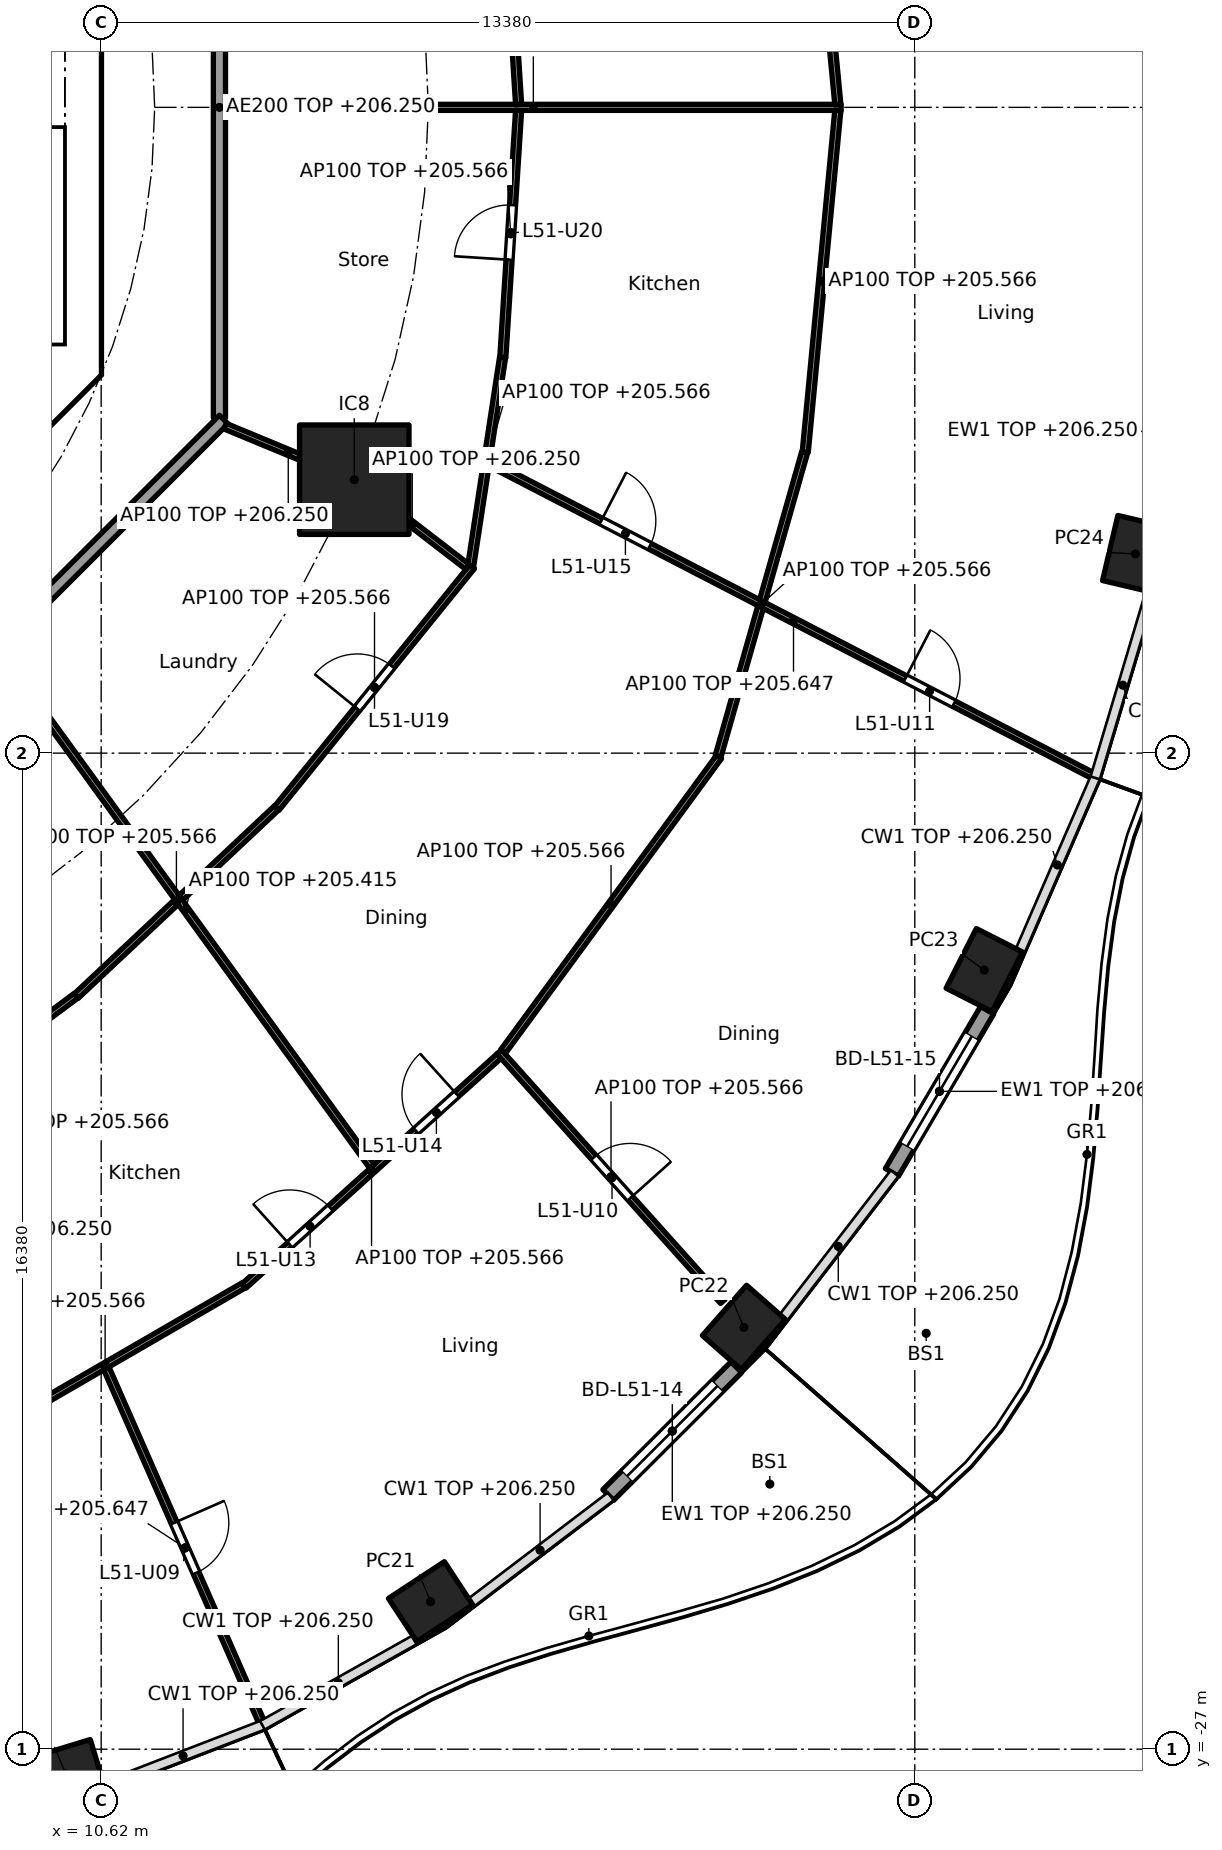
"""IFC4 building model, lengths in metres.
Left out: names, types, materials, properties, quantities, classifications, styles, units other than length and angle.
Written with IfcOpenShell. Run it as: python <this file> out.ifc"""

import sys

from ifc_helpers import new_model, si_unit, direction, frame, frame_2d, origin, origin_2d, place, context, subcontext, project, spatial, polyline, rectangle, hollow_rectangle, outline, extrude, element, fill, save


model = new_model("IFC4")
c1 = context("Model", 3, precision=1e-05, world=origin(), true_north=direction((0.0, 1.0)))
c2 = subcontext(c1, "Body", "Model", "MODEL_VIEW")
j1 = project(units=[si_unit("LENGTHUNIT", "METRE"), si_unit("PLANEANGLEUNIT", "RADIAN")], contexts=[c1])
p1 = place(None, origin())
s1 = spatial("IfcSite", under=j1, at=p1, CompositionType="ELEMENT")
p2 = place(p1, origin())
s2 = spatial("IfcBuilding", under=s1, at=p2, CompositionType="ELEMENT")
p3 = place(p2, frame((0.0, 0.0, 202.9)))
s3 = spatial("IfcBuildingStorey", under=s2, at=p3, CompositionType="ELEMENT", Elevation=202.9)
for number, where, z_axis, x_axis in (
    (1, (10.038, -27.408, 0.0), (0.0, 0.0, 1.0), (0.957, 0.292, 0.0)),
    (2, (16.038, -24.573, 0.0), (0.0, 0.0, 1.0), (0.836, 0.549, 0.0)),
    (3, (21.189, -20.064, 0.0), (0.0, 0.0, 1.0), (0.66, 0.751, 0.0)),
    (4, (25.142, -14.188, 0.0), (0.0, 0.0, 1.0), (0.452, 0.892, 0.0)),
    (5, (27.627, -7.344, 0.0), (0.0, 0.0, 1.0), (0.229, 0.973, 0.0)),
):
    element("IfcColumn", number, at=place(p3, frame(where, z_axis=z_axis, x_axis=x_axis)), inside=s3, PredefinedType="COLUMN", context=c2, shape_type="SweptSolid", body=[
        extrude(hollow_rectangle(XDim=1.1, YDim=0.85, WallThickness=0.036, at=origin_2d()), origin(), (0.0, 0.0, 1.0), 3.7),
    ])
p4 = place(p3, frame((14.782, -6.123, 0.0), z_axis=(0.0, 0.0, 1.0), x_axis=(1.0, 0.0, 0.0)))
e6 = element("IfcColumn", 6, at=p4, inside=s3, PredefinedType="COLUMN", context=c2, shape_type="SweptSolid", body=[
    extrude(rectangle(XDim=1.8, YDim=1.8, at=origin_2d()), origin(), (0.0, 0.0, 1.0), 3.7),
])
p5 = place(p3, frame((21.065, -20.718, 0.0), z_axis=(0.0, 0.0, 1.0), x_axis=(-0.707844845069, -0.706367946122, 0.0)))
e7 = element("IfcWall", 7, at=p5, inside=s3, PredefinedType="SOLIDWALL", context=c2, shape_type="SweptSolid", body=[
    extrude(rectangle(XDim=2.976, YDim=0.25, at=frame_2d((1.488, 0.0))), origin(), (0.0, 0.0, 1.0), 3.35),
])
p6 = place(p5, frame((0.438, 0.0, 0.0)))
e8 = element("IfcOpeningElement", 8, at=p6, cuts=e7, PredefinedType="OPENING", context=c2, shape_type="SweptSolid", body=[
    extrude(rectangle(XDim=2.1, YDim=2.4, at=frame_2d((1.05, 1.2))), frame((0.0, 0.135, 0.0), z_axis=(0.0, -1.0, 0.0), x_axis=(1.0, 0.0, 0.0)), (0.0, 0.0, 1.0), 0.27),
])
p7 = place(p3, frame((25.189, -14.848, 0.0), z_axis=(0.0, 0.0, 1.0), x_axis=(-0.506367803691, -0.862317602386, 0.0)))
e9 = element("IfcWall", 9, at=p7, inside=s3, PredefinedType="SOLIDWALL", context=c2, shape_type="SweptSolid", body=[
    extrude(rectangle(XDim=3.092, YDim=0.25, at=frame_2d((1.546, 0.0))), origin(), (0.0, 0.0, 1.0), 3.35),
])
p8 = place(p7, frame((0.496, 0.0, 0.0)))
e10 = element("IfcOpeningElement", 10, at=p8, cuts=e9, PredefinedType="OPENING", context=c2, shape_type="SweptSolid", body=[
    extrude(rectangle(XDim=2.1, YDim=2.4, at=frame_2d((1.05, 1.2))), frame((0.0, 0.135, 0.0), z_axis=(0.0, -1.0, 0.0), x_axis=(1.0, 0.0, 0.0)), (0.0, 0.0, 1.0), 0.27),
])
p9 = place(p3, frame((4.613, -9.988, 0.0), z_axis=(0.0, 0.0, 1.0), x_axis=(0.707106781187, 0.707106781187, 0.0)))
e11 = element("IfcWall", 11, at=p9, inside=s3, PredefinedType="SHEAR", context=c2, shape_type="SweptSolid", body=[
    extrude(rectangle(XDim=7.602, YDim=0.6, at=frame_2d((3.801, 0.0))), origin(), (0.0, 0.0, 1.0), 3.35),
])
p10 = place(p9, frame((3.201, 0.0, 0.0)))
e12 = element("IfcOpeningElement", 12, at=p10, cuts=e11, PredefinedType="OPENING", context=c2, shape_type="SweptSolid", body=[
    extrude(rectangle(XDim=1.2, YDim=2.1, at=frame_2d((0.6, 1.05))), frame((0.0, 0.31, 0.0), z_axis=(0.0, -1.0, 0.0), x_axis=(1.0, 0.0, 0.0)), (0.0, 0.0, 1.0), 0.62),
])
p11 = place(p3, origin())
e13 = element("IfcWall", 13, at=p11, inside=s3, PredefinedType="SHEAR", context=c2, shape_type="SweptSolid", body=[
    extrude(outline(polyline([(9.776, -4.401), (10.025, -4.152), (10.025, -3.801), (10.025, 4.152), (9.776, 4.401), (10.2, 4.825), (10.625, 4.401), (10.625, -4.401), (10.2, -4.825), (9.776, -4.401)])), origin(), (0.0, 0.0, 1.0), 3.35),
])
p12 = place(p3, origin())
e14 = element("IfcWall", 14, at=p12, inside=s3, PredefinedType="SOLIDWALL", context=c2, shape_type="SweptSolid", body=[
    extrude(outline(polyline([(10.025, -4.1), (6.7, -4.1), (6.7, -3.9), (10.025, -3.9), (10.025, -4.1)])), origin(), (0.0, 0.0, 1.0), 3.35),
])
p13 = place(p3, frame((12.565, -5.104, 0.0), z_axis=(0.0, 0.0, 1.0), x_axis=(0.0, 1.0, 0.0)))
e15 = element("IfcWall", 15, at=p13, inside=s3, PredefinedType="PARTITIONING", context=c2, shape_type="SweptSolid", body=[
    extrude(rectangle(XDim=10.209, YDim=0.2, at=frame_2d((5.104, 0.0))), origin(), (0.0, 0.0, 1.0), 3.35),
])
p14 = place(p3, frame((5.275, -12.494, 0.0), z_axis=(0.0, 0.0, 1.0), x_axis=(0.707106781187, 0.707106781187, 0.0)))
e16 = element("IfcWall", 16, at=p14, inside=s3, PredefinedType="PARTITIONING", context=c2, shape_type="SweptSolid", body=[
    extrude(rectangle(XDim=10.409, YDim=0.2, at=frame_2d((5.205, 0.0))), origin(), (0.0, 0.0, 1.0), 3.35),
])
p15 = place(p3, frame((12.665, 0.0, 0.0), z_axis=(0.0, 0.0, 1.0), x_axis=(1.0, 0.0, 0.0)))
e17 = element("IfcWall", 17, at=p15, inside=s3, PredefinedType="PARTITIONING", context=c2, shape_type="SweptSolid", body=[
    extrude(rectangle(XDim=10.124, YDim=0.1, at=frame_2d((5.062, 0.0))), origin(), (0.0, 0.0, 1.0), 2.515),
])
p16 = place(p3, frame((17.485, 0.05, 0.0), z_axis=(0.0, 0.0, 1.0), x_axis=(-0.063673473968, 0.997970785501, 0.0)))
e18 = element("IfcWall", 18, at=p16, inside=s3, PredefinedType="PARTITIONING", context=c2, shape_type="SweptSolid", body=[
    extrude(rectangle(XDim=4.072, YDim=0.1, at=frame_2d((2.036, 0.0))), origin(), (0.0, 0.0, 1.0), 2.666),
])
p17 = place(p16, frame((1.561, 0.0, 0.0)))
e19 = element("IfcOpeningElement", 19, at=p17, cuts=e18, PredefinedType="OPENING", context=c2, shape_type="SweptSolid", body=[
    extrude(rectangle(XDim=0.9, YDim=2.1, at=frame_2d((0.45, 1.05))), frame((0.0, 0.06, 0.0), z_axis=(0.0, -1.0, 0.0), x_axis=(1.0, 0.0, 0.0)), (0.0, 0.0, 1.0), 0.12),
])
p18 = place(p3, frame((17.485, -0.05, 0.0), z_axis=(0.0, 0.0, 1.0), x_axis=(-0.063673473968, -0.997970785501, 0.0)))
e20 = element("IfcWall", 20, at=p18, inside=s3, PredefinedType="PARTITIONING", context=c2, shape_type="SweptSolid", body=[
    extrude(rectangle(XDim=4.072, YDim=0.1, at=frame_2d((2.036, 0.0))), origin(), (0.0, 0.0, 1.0), 2.666),
])
p19 = place(p18, frame((1.561, 0.0, 0.0)))
e21 = element("IfcOpeningElement", 21, at=p19, cuts=e20, PredefinedType="OPENING", context=c2, shape_type="SweptSolid", body=[
    extrude(rectangle(XDim=0.9, YDim=2.1, at=frame_2d((0.45, 1.05))), frame((0.0, 0.06, 0.0), z_axis=(0.0, -1.0, 0.0), x_axis=(1.0, 0.0, 0.0)), (0.0, 0.0, 1.0), 0.12),
])
p20 = place(p3, frame((22.734, 0.05, 0.0), z_axis=(0.0, 0.0, 1.0), x_axis=(-0.0949274088, 0.995484197292, 0.0)))
e22 = element("IfcWall", 22, at=p20, inside=s3, PredefinedType="PARTITIONING", context=c2, shape_type="SweptSolid", body=[
    extrude(rectangle(XDim=5.648, YDim=0.1, at=frame_2d((2.824, 0.0))), origin(), (0.0, 0.0, 1.0), 2.666),
])
p21 = place(p20, frame((0.937, 0.0, 0.0)))
e23 = element("IfcOpeningElement", 23, at=p21, cuts=e22, PredefinedType="OPENING", context=c2, shape_type="SweptSolid", body=[
    extrude(rectangle(XDim=0.9, YDim=2.1, at=frame_2d((0.45, 1.05))), frame((0.0, 0.06, 0.0), z_axis=(0.0, -1.0, 0.0), x_axis=(1.0, 0.0, 0.0)), (0.0, 0.0, 1.0), 0.12),
])
p22 = place(p3, frame((22.734, -0.05, 0.0), z_axis=(0.0, 0.0, 1.0), x_axis=(-0.0949274088, -0.995484197292, 0.0)))
e24 = element("IfcWall", 24, at=p22, inside=s3, PredefinedType="PARTITIONING", context=c2, shape_type="SweptSolid", body=[
    extrude(rectangle(XDim=5.648, YDim=0.1, at=frame_2d((2.824, 0.0))), origin(), (0.0, 0.0, 1.0), 2.666),
])
p23 = place(p3, frame((6.881, -17.08, 0.0), z_axis=(0.0, 0.0, 1.0), x_axis=(0.802784956441, 0.596268659005, 0.0)))
e25 = element("IfcWall", 25, at=p23, inside=s3, PredefinedType="PARTITIONING", context=c2, shape_type="SweptSolid", body=[
    extrude(rectangle(XDim=4.142, YDim=0.1, at=frame_2d((2.071, 0.0))), origin(), (0.0, 0.0, 1.0), 2.666),
])
p24 = place(p23, frame((2.384, 0.0, 0.0)))
e26 = element("IfcOpeningElement", 26, at=p24, cuts=e25, PredefinedType="OPENING", context=c2, shape_type="SweptSolid", body=[
    extrude(rectangle(XDim=0.9, YDim=2.1, at=frame_2d((0.45, 1.05))), frame((0.0, 0.06, 0.0), z_axis=(0.0, -1.0, 0.0), x_axis=(1.0, 0.0, 0.0)), (0.0, 0.0, 1.0), 0.12),
])
p25 = place(p3, frame((8.405, -22.013, 0.0), z_axis=(0.0, 0.0, 1.0), x_axis=(0.865277177388, 0.501293732547, 0.0)))
e27 = element("IfcWall", 27, at=p25, inside=s3, PredefinedType="PARTITIONING", context=c2, shape_type="SweptSolid", body=[
    extrude(rectangle(XDim=5.27, YDim=0.1, at=frame_2d((2.635, 0.0))), origin(), (0.0, 0.0, 1.0), 2.666),
])
p26 = place(p3, frame((10.705, -20.738, 0.0), z_axis=(0.0, 0.0, 1.0), x_axis=(0.401740633891, -0.915753494714, 0.0)))
e28 = element("IfcWall", 28, at=p26, inside=s3, PredefinedType="PARTITIONING", context=c2, shape_type="SweptSolid", body=[
    extrude(rectangle(XDim=6.445, YDim=0.1, at=frame_2d((3.223, 0.0))), origin(), (0.0, 0.0, 1.0), 2.747),
])
p27 = place(p26, frame((2.773, 0.0, 0.0)))
e29 = element("IfcOpeningElement", 29, at=p27, cuts=e28, PredefinedType="OPENING", context=c2, shape_type="SweptSolid", body=[
    extrude(rectangle(XDim=0.9, YDim=2.1, at=frame_2d((0.45, 1.05))), frame((0.0, 0.06, 0.0), z_axis=(0.0, -1.0, 0.0), x_axis=(1.0, 0.0, 0.0)), (0.0, 0.0, 1.0), 0.12),
])
p28 = place(p3, frame((10.21, -14.614, 0.0), z_axis=(0.0, 0.0, 1.0), x_axis=(0.728883199496, 0.684638066055, 0.0)))
e30 = element("IfcWall", 30, at=p28, inside=s3, PredefinedType="PARTITIONING", context=c2, shape_type="SweptSolid", body=[
    extrude(rectangle(XDim=4.519, YDim=0.1, at=frame_2d((2.26, 0.0))), origin(), (0.0, 0.0, 1.0), 2.666),
])
p29 = place(p3, frame((12.971, -19.38, 0.0), z_axis=(0.0, 0.0, 1.0), x_axis=(0.742768881471, 0.669547898748, 0.0)))
e31 = element("IfcWall", 31, at=p29, inside=s3, PredefinedType="PARTITIONING", context=c2, shape_type="SweptSolid", body=[
    extrude(rectangle(XDim=5.642, YDim=0.1, at=frame_2d((2.821, 0.0))), origin(), (0.0, 0.0, 1.0), 2.666),
])
p30 = place(p29, frame((1.01, 0.0, 0.0)))
e32 = element("IfcOpeningElement", 32, at=p30, cuts=e31, PredefinedType="OPENING", context=c2, shape_type="SweptSolid", body=[
    extrude(rectangle(XDim=0.9, YDim=2.1, at=frame_2d((0.45, 1.05))), frame((0.0, 0.06, 0.0), z_axis=(0.0, -1.0, 0.0), x_axis=(1.0, 0.0, 0.0)), (0.0, 0.0, 1.0), 0.12),
])
p31 = place(p29, frame((3.806, 0.0, 0.0)))
e33 = element("IfcOpeningElement", 33, at=p31, cuts=e31, PredefinedType="OPENING", context=c2, shape_type="SweptSolid", body=[
    extrude(rectangle(XDim=0.9, YDim=2.1, at=frame_2d((0.45, 1.05))), frame((0.0, 0.06, 0.0), z_axis=(0.0, -1.0, 0.0), x_axis=(1.0, 0.0, 0.0)), (0.0, 0.0, 1.0), 0.12),
])
p32 = place(p3, frame((8.943, -8.966, 0.0), z_axis=(0.0, 0.0, 1.0), x_axis=(0.587181355751, -0.809455406714, 0.0)))
e34 = element("IfcWall", 34, at=p32, inside=s3, PredefinedType="PARTITIONING", context=c2, shape_type="SweptSolid", body=[
    extrude(rectangle(XDim=10.441, YDim=0.1, at=frame_2d((5.221, 0.0))), origin(), (0.0, 0.0, 1.0), 2.515),
])
p33 = place(p3, frame((13.509, -11.525, 0.0), z_axis=(0.0, 0.0, 1.0), x_axis=(0.628778729481, 0.777584277974, 0.0)))
e35 = element("IfcWall", 35, at=p33, inside=s3, PredefinedType="PARTITIONING", context=c2, shape_type="SweptSolid", body=[
    extrude(rectangle(XDim=5.107, YDim=0.1, at=frame_2d((2.554, 0.0))), origin(), (0.0, 0.0, 1.0), 2.666),
])
p34 = place(p33, frame((2.104, 0.0, 0.0)))
e36 = element("IfcOpeningElement", 36, at=p34, cuts=e35, PredefinedType="OPENING", context=c2, shape_type="SweptSolid", body=[
    extrude(rectangle(XDim=0.9, YDim=2.1, at=frame_2d((0.45, 1.05))), frame((0.0, 0.06, 0.0), z_axis=(0.0, -1.0, 0.0), x_axis=(1.0, 0.0, 0.0)), (0.0, 0.0, 1.0), 0.12),
])
p35 = place(p3, frame((17.166, -15.532, 0.0), z_axis=(0.0, 0.0, 1.0), x_axis=(0.66728415915, -0.744803229684, 0.0)))
e37 = element("IfcWall", 37, at=p35, inside=s3, PredefinedType="PARTITIONING", context=c2, shape_type="SweptSolid", body=[
    extrude(rectangle(XDim=5.511, YDim=0.1, at=frame_2d((2.756, 0.0))), origin(), (0.0, 0.0, 1.0), 2.666),
])
p36 = place(p35, frame((2.331, 0.0, 0.0)))
e38 = element("IfcOpeningElement", 38, at=p36, cuts=e37, PredefinedType="OPENING", context=c2, shape_type="SweptSolid", body=[
    extrude(rectangle(XDim=0.9, YDim=2.1, at=frame_2d((0.45, 1.05))), frame((0.0, 0.06, 0.0), z_axis=(0.0, -1.0, 0.0), x_axis=(1.0, 0.0, 0.0)), (0.0, 0.0, 1.0), 0.12),
])
p37 = place(p3, frame((17.229, -15.529, 0.0), z_axis=(0.0, 0.0, 1.0), x_axis=(0.591117075283, 0.806585769345, 0.0)))
e39 = element("IfcWall", 39, at=p37, inside=s3, PredefinedType="PARTITIONING", context=c2, shape_type="SweptSolid", body=[
    extrude(rectangle(XDim=6.01, YDim=0.1, at=frame_2d((3.005, 0.0))), origin(), (0.0, 0.0, 1.0), 2.666),
])
p38 = place(p3, frame((12.657, -5.243, 0.0), z_axis=(0.0, 0.0, 1.0), x_axis=(0.923826362943, -0.382811769845, 0.0)))
e40 = element("IfcWall", 40, at=p38, inside=s3, PredefinedType="PARTITIONING", context=c2, shape_type="SweptSolid", body=[
    extrude(rectangle(XDim=2.25, YDim=0.1, at=frame_2d((1.125, 0.0))), origin(), (0.0, 0.0, 1.0), 3.35),
])
p39 = place(p3, frame((14.822, -6.154, 0.0), z_axis=(0.0, 0.0, 1.0), x_axis=(0.792226528082, -0.610227111987, 0.0)))
e41 = element("IfcWall", 41, at=p39, inside=s3, PredefinedType="PARTITIONING", context=c2, shape_type="SweptSolid", body=[
    extrude(rectangle(XDim=2.307, YDim=0.1, at=frame_2d((1.154, 0.0))), origin(), (0.0, 0.0, 1.0), 3.35),
])
p40 = place(p3, frame((16.697, -7.543, 0.0), z_axis=(0.0, 0.0, 1.0), x_axis=(0.151078880423, 0.988521710379, 0.0)))
e42 = element("IfcWall", 42, at=p40, inside=s3, PredefinedType="PARTITIONING", context=c2, shape_type="SweptSolid", body=[
    extrude(rectangle(XDim=3.469, YDim=0.1, at=frame_2d((1.735, 0.0))), origin(), (0.0, 0.0, 1.0), 2.666),
])
p41 = place(p3, frame((20.765, -10.673, 0.0), z_axis=(0.0, 0.0, 1.0), x_axis=(0.273815967041, 0.961782104322, 0.0)))
e43 = element("IfcWall", 43, at=p41, inside=s3, PredefinedType="PARTITIONING", context=c2, shape_type="SweptSolid", body=[
    extrude(rectangle(XDim=5.202, YDim=0.1, at=frame_2d((2.601, 0.0))), origin(), (0.0, 0.0, 1.0), 2.666),
])
p42 = place(p3, frame((17.003, -5.851, 0.0), z_axis=(0.0, 0.0, 1.0), x_axis=(0.888005628038, -0.4598325832, 0.0)))
e44 = element("IfcWall", 44, at=p42, inside=s3, PredefinedType="PARTITIONING", context=c2, shape_type="SweptSolid", body=[
    extrude(rectangle(XDim=11.266, YDim=0.1, at=frame_2d((5.633, 0.0))), origin(), (0.0, 0.0, 1.0), 2.747),
])
p43 = place(p42, frame((7.703, 0.0, 0.0)))
e45 = element("IfcOpeningElement", 45, at=p43, cuts=e44, PredefinedType="OPENING", context=c2, shape_type="SweptSolid", body=[
    extrude(rectangle(XDim=0.9, YDim=2.1, at=frame_2d((0.45, 1.05))), frame((0.0, 0.06, 0.0), z_axis=(0.0, -1.0, 0.0), x_axis=(1.0, 0.0, 0.0)), (0.0, 0.0, 1.0), 0.12),
])
p44 = place(p42, frame((2.07, 0.0, 0.0)))
e46 = element("IfcOpeningElement", 46, at=p44, cuts=e44, PredefinedType="OPENING", context=c2, shape_type="SweptSolid", body=[
    extrude(rectangle(XDim=0.9, YDim=2.1, at=frame_2d((0.45, 1.05))), frame((0.0, 0.06, 0.0), z_axis=(0.0, -1.0, 0.0), x_axis=(1.0, 0.0, 0.0)), (0.0, 0.0, 1.0), 0.12),
])
p45 = place(p6, origin())
e47 = element("IfcDoor", 47, at=p45, inside=s3, OperationType="SLIDING_TO_LEFT", PredefinedType="DOOR", context=c2, shape_type="SweptSolid", body=[
    extrude(rectangle(XDim=2.1, YDim=2.4, at=frame_2d((1.05, 1.2))), frame((0.0, 0.025, 0.0), z_axis=(0.0, -1.0, 0.0), x_axis=(1.0, 0.0, 0.0)), (0.0, 0.0, 1.0), 0.05),
])
fill(e8, e47)
p46 = place(p8, origin())
e48 = element("IfcDoor", 48, at=p46, inside=s3, OperationType="SLIDING_TO_LEFT", PredefinedType="DOOR", context=c2, shape_type="SweptSolid", body=[
    extrude(rectangle(XDim=2.1, YDim=2.4, at=frame_2d((1.05, 1.2))), frame((0.0, 0.025, 0.0), z_axis=(0.0, -1.0, 0.0), x_axis=(1.0, 0.0, 0.0)), (0.0, 0.0, 1.0), 0.05),
])
fill(e10, e48)
p47 = place(p27, origin())
e49 = element("IfcDoor", 49, at=p47, inside=s3, OperationType="SINGLE_SWING_LEFT", PredefinedType="DOOR", context=c2, shape_type="SweptSolid", body=[
    extrude(rectangle(XDim=0.9, YDim=2.1, at=frame_2d((0.45, 1.05))), frame((0.0, 0.025, 0.0), z_axis=(0.0, -1.0, 0.0), x_axis=(1.0, 0.0, 0.0)), (0.0, 0.0, 1.0), 0.05),
])
fill(e29, e49)
p48 = place(p36, origin())
e50 = element("IfcDoor", 50, at=p48, inside=s3, OperationType="SINGLE_SWING_RIGHT", PredefinedType="DOOR", context=c2, shape_type="SweptSolid", body=[
    extrude(rectangle(XDim=0.9, YDim=2.1, at=frame_2d((0.45, 1.05))), frame((0.0, 0.025, 0.0), z_axis=(0.0, -1.0, 0.0), x_axis=(1.0, 0.0, 0.0)), (0.0, 0.0, 1.0), 0.05),
])
fill(e38, e50)
p49 = place(p43, origin())
e51 = element("IfcDoor", 51, at=p49, inside=s3, OperationType="SINGLE_SWING_LEFT", PredefinedType="DOOR", context=c2, shape_type="SweptSolid", body=[
    extrude(rectangle(XDim=0.9, YDim=2.1, at=frame_2d((0.45, 1.05))), frame((0.0, 0.025, 0.0), z_axis=(0.0, -1.0, 0.0), x_axis=(1.0, 0.0, 0.0)), (0.0, 0.0, 1.0), 0.05),
])
fill(e45, e51)
p50 = place(p30, origin())
e52 = element("IfcDoor", 52, at=p50, inside=s3, OperationType="SINGLE_SWING_LEFT", PredefinedType="DOOR", context=c2, shape_type="SweptSolid", body=[
    extrude(rectangle(XDim=0.9, YDim=2.1, at=frame_2d((0.45, 1.05))), frame((0.0, 0.025, 0.0), z_axis=(0.0, -1.0, 0.0), x_axis=(1.0, 0.0, 0.0)), (0.0, 0.0, 1.0), 0.05),
])
fill(e32, e52)
p51 = place(p31, origin())
e53 = element("IfcDoor", 53, at=p51, inside=s3, OperationType="SINGLE_SWING_RIGHT", PredefinedType="DOOR", context=c2, shape_type="SweptSolid", body=[
    extrude(rectangle(XDim=0.9, YDim=2.1, at=frame_2d((0.45, 1.05))), frame((0.0, 0.025, 0.0), z_axis=(0.0, -1.0, 0.0), x_axis=(1.0, 0.0, 0.0)), (0.0, 0.0, 1.0), 0.05),
])
fill(e33, e53)
p52 = place(p44, origin())
e54 = element("IfcDoor", 54, at=p52, inside=s3, OperationType="SINGLE_SWING_LEFT", PredefinedType="DOOR", context=c2, shape_type="SweptSolid", body=[
    extrude(rectangle(XDim=0.9, YDim=2.1, at=frame_2d((0.45, 1.05))), frame((0.0, 0.025, 0.0), z_axis=(0.0, -1.0, 0.0), x_axis=(1.0, 0.0, 0.0)), (0.0, 0.0, 1.0), 0.05),
])
fill(e46, e54)
p53 = place(p34, origin())
e55 = element("IfcDoor", 55, at=p53, inside=s3, OperationType="SINGLE_SWING_LEFT", PredefinedType="DOOR", context=c2, shape_type="SweptSolid", body=[
    extrude(rectangle(XDim=0.9, YDim=2.1, at=frame_2d((0.45, 1.05))), frame((0.0, 0.025, 0.0), z_axis=(0.0, -1.0, 0.0), x_axis=(1.0, 0.0, 0.0)), (0.0, 0.0, 1.0), 0.05),
])
fill(e36, e55)
p54 = place(p19, frame((0.9, 0.0, 0.0), x_axis=(-1.0, 0.0, 0.0)))
e56 = element("IfcDoor", 56, at=p54, inside=s3, OperationType="SINGLE_SWING_LEFT", PredefinedType="DOOR", context=c2, shape_type="SweptSolid", body=[
    extrude(rectangle(XDim=0.9, YDim=2.1, at=frame_2d((0.45, 1.05))), frame((0.0, 0.025, 0.0), z_axis=(0.0, -1.0, 0.0), x_axis=(1.0, 0.0, 0.0)), (0.0, 0.0, 1.0), 0.05),
])
fill(e21, e56)
save(model, sys.argv[1])
